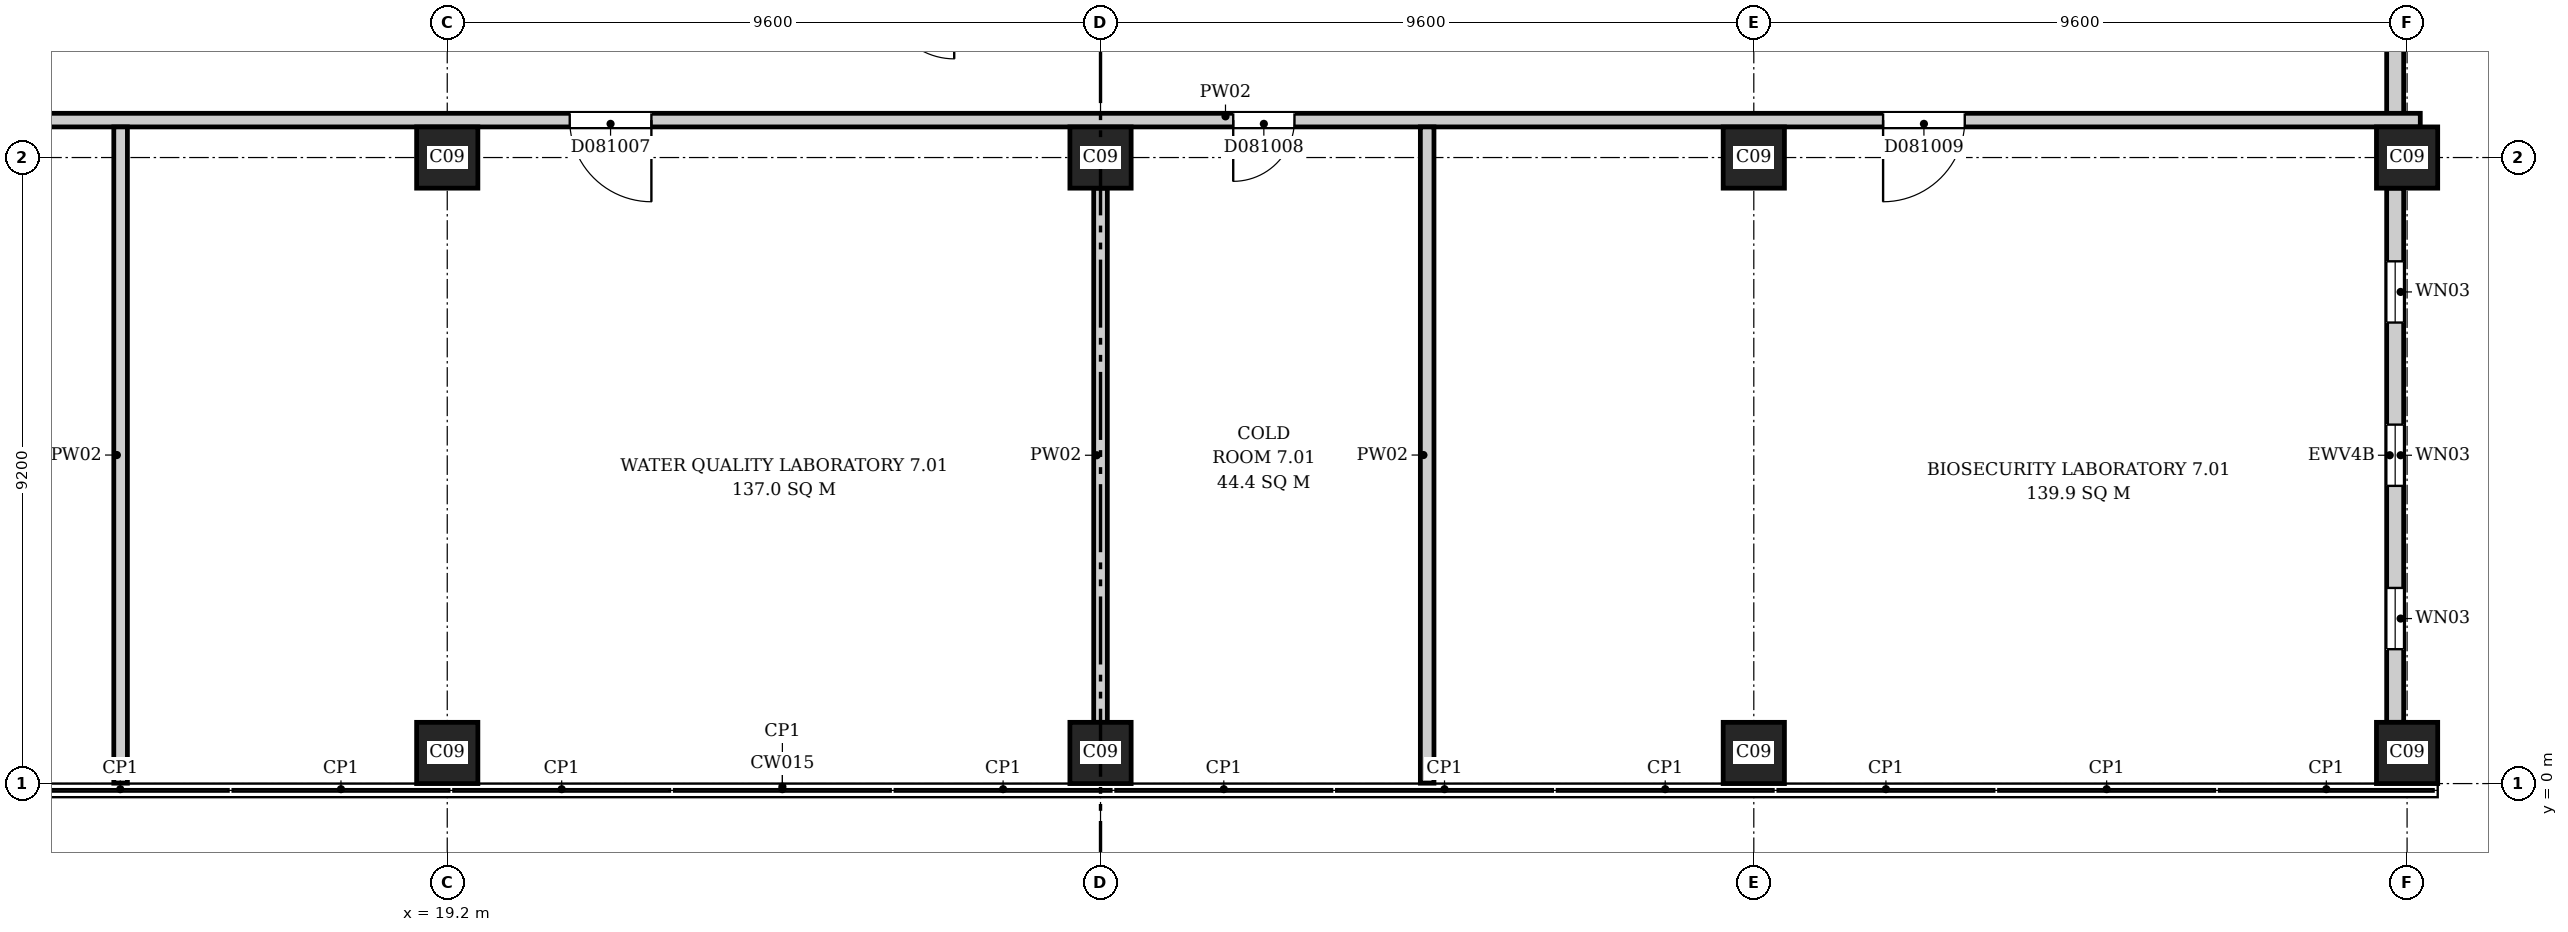
"""IFC4 building model, lengths in metres.
Left out: names, types, materials, properties, quantities, classifications, styles, units other than length and angle.
Written with IfcOpenShell. Run it as: python <this file> out.ifc"""

import sys

from ifc_helpers import new_model, si_unit, direction, frame, frame_2d, origin, origin_2d, place, context, subcontext, project, spatial, rectangle, extrude, element, fill, save


model = new_model("IFC4")
c1 = context("Model", 3, precision=1e-05, world=origin(), true_north=direction((0.0, 1.0)))
c2 = subcontext(c1, "Body", "Model", "MODEL_VIEW")
j1 = project(units=[si_unit("LENGTHUNIT", "METRE"), si_unit("PLANEANGLEUNIT", "RADIAN")], contexts=[c1])
p1 = place(None, origin())
s1 = spatial("IfcSite", under=j1, at=p1, CompositionType="ELEMENT")
p2 = place(p1, origin())
s2 = spatial("IfcBuilding", under=s1, at=p2, CompositionType="ELEMENT")
p3 = place(p2, frame((0.0, 0.0, 40.3)))
s3 = spatial("IfcBuildingStorey", under=s2, at=p3, CompositionType="ELEMENT", Elevation=40.3)
for number, where, z_axis, x_axis in (
    (1, (19.2, 0.45, 0.0), (0.0, 0.0, 1.0), (1.0, 0.0, 0.0)),
    (2, (28.8, 0.45, 0.0), (0.0, 0.0, 1.0), (1.0, 0.0, 0.0)),
    (3, (38.4, 0.45, 0.0), (0.0, 0.0, 1.0), (1.0, 0.0, 0.0)),
    (4, (48.0, 0.45, 0.0), (0.0, 0.0, 1.0), (1.0, 0.0, 0.0)),
    (5, (19.2, 9.2, 0.0), (0.0, 0.0, 1.0), (1.0, 0.0, 0.0)),
    (6, (28.8, 9.2, 0.0), (0.0, 0.0, 1.0), (1.0, 0.0, 0.0)),
    (7, (38.4, 9.2, 0.0), (0.0, 0.0, 1.0), (1.0, 0.0, 0.0)),
    (8, (48.0, 9.2, 0.0), (0.0, 0.0, 1.0), (1.0, 0.0, 0.0)),
):
    element("IfcColumn", number, at=place(p3, frame(where, z_axis=z_axis, x_axis=x_axis)), inside=s3, PredefinedType="COLUMN", context=c2, shape_type="SweptSolid", body=[
        extrude(rectangle(XDim=0.9, YDim=0.9, at=origin_2d()), origin(), (0.0, 0.0, 1.0), 4.2),
    ])
p4 = place(p3, frame((47.825, 0.9, 0.0), z_axis=(0.0, 0.0, 1.0), x_axis=(0.0, 1.0, 0.0)))
e9 = element("IfcWall", 9, at=p4, inside=s3, PredefinedType="ELEMENTEDWALL", context=c2, shape_type="SweptSolid", body=[
    extrude(rectangle(XDim=7.85, YDim=0.25, at=frame_2d((3.925, 0.0))), origin(), (0.0, 0.0, 1.0), 3.3),
])
p5 = place(p4, frame((1.075, 0.0, 0.6)))
e10 = element("IfcOpeningElement", 10, at=p5, cuts=e9, PredefinedType="OPENING", context=c2, shape_type="SweptSolid", body=[
    extrude(rectangle(XDim=0.9, YDim=2.6, at=frame_2d((0.45, 1.3))), frame((0.0, 0.135, 0.0), z_axis=(0.0, -1.0, 0.0), x_axis=(1.0, 0.0, 0.0)), (0.0, 0.0, 1.0), 0.27),
])
p6 = place(p4, frame((3.475, 0.0, 0.6)))
e11 = element("IfcOpeningElement", 11, at=p6, cuts=e9, PredefinedType="OPENING", context=c2, shape_type="SweptSolid", body=[
    extrude(rectangle(XDim=0.9, YDim=2.6, at=frame_2d((0.45, 1.3))), frame((0.0, 0.135, 0.0), z_axis=(0.0, -1.0, 0.0), x_axis=(1.0, 0.0, 0.0)), (0.0, 0.0, 1.0), 0.27),
])
p7 = place(p4, frame((5.875, 0.0, 0.6)))
e12 = element("IfcOpeningElement", 12, at=p7, cuts=e9, PredefinedType="OPENING", context=c2, shape_type="SweptSolid", body=[
    extrude(rectangle(XDim=0.9, YDim=2.6, at=frame_2d((0.45, 1.3))), frame((0.0, 0.135, 0.0), z_axis=(0.0, -1.0, 0.0), x_axis=(1.0, 0.0, 0.0)), (0.0, 0.0, 1.0), 0.27),
])
p8 = place(p3, frame((47.825, 9.65, 0.0), z_axis=(0.0, 0.0, 1.0), x_axis=(0.0, 1.0, 0.0)))
e13 = element("IfcWall", 13, at=p8, inside=s3, PredefinedType="ELEMENTEDWALL", context=c2, shape_type="SweptSolid", body=[
    extrude(rectangle(XDim=8.3, YDim=0.25, at=frame_2d((4.15, 0.0))), origin(), (0.0, 0.0, 1.0), 3.3),
])
p9 = place(p8, frame((1.3, 0.0, 0.6)))
e14 = element("IfcOpeningElement", 14, at=p9, cuts=e13, PredefinedType="OPENING", context=c2, shape_type="SweptSolid", body=[
    extrude(rectangle(XDim=0.9, YDim=2.6, at=frame_2d((0.45, 1.3))), frame((0.0, 0.135, 0.0), z_axis=(0.0, -1.0, 0.0), x_axis=(1.0, 0.0, 0.0)), (0.0, 0.0, 1.0), 0.27),
])
p10 = place(p8, frame((3.7, 0.0, 0.6)))
e15 = element("IfcOpeningElement", 15, at=p10, cuts=e13, PredefinedType="OPENING", context=c2, shape_type="SweptSolid", body=[
    extrude(rectangle(XDim=0.9, YDim=2.6, at=frame_2d((0.45, 1.3))), frame((0.0, 0.135, 0.0), z_axis=(0.0, -1.0, 0.0), x_axis=(1.0, 0.0, 0.0)), (0.0, 0.0, 1.0), 0.27),
])
p11 = place(p8, frame((6.1, 0.0, 0.6)))
e16 = element("IfcOpeningElement", 16, at=p11, cuts=e13, PredefinedType="OPENING", context=c2, shape_type="SweptSolid", body=[
    extrude(rectangle(XDim=0.9, YDim=2.6, at=frame_2d((0.45, 1.3))), frame((0.0, 0.135, 0.0), z_axis=(0.0, -1.0, 0.0), x_axis=(1.0, 0.0, 0.0)), (0.0, 0.0, 1.0), 0.27),
])
p12 = place(p3, frame((4.3, 9.75, 0.0), z_axis=(0.0, 0.0, 1.0), x_axis=(1.0, 0.0, 0.0)))
e17 = element("IfcWall", 17, at=p12, inside=s3, PredefinedType="PARTITIONING", context=c2, shape_type="SweptSolid", body=[
    extrude(rectangle(XDim=43.894, YDim=0.2, at=frame_2d((21.947, 0.0))), origin(), (0.0, 0.0, 1.0), 3.9),
])
p13 = place(p12, frame((3.65, 0.0, 0.0)))
e18 = element("IfcOpeningElement", 18, at=p13, cuts=e17, PredefinedType="OPENING", context=c2, shape_type="SweptSolid", body=[
    extrude(rectangle(XDim=1.2, YDim=2.1, at=frame_2d((0.6, 1.05))), frame((0.0, 0.11, 0.0), z_axis=(0.0, -1.0, 0.0), x_axis=(1.0, 0.0, 0.0)), (0.0, 0.0, 1.0), 0.22),
])
p14 = place(p12, frame((16.7, 0.0, 0.0)))
e19 = element("IfcOpeningElement", 19, at=p14, cuts=e17, PredefinedType="OPENING", context=c2, shape_type="SweptSolid", body=[
    extrude(rectangle(XDim=1.2, YDim=2.1, at=frame_2d((0.6, 1.05))), frame((0.0, 0.11, 0.0), z_axis=(0.0, -1.0, 0.0), x_axis=(1.0, 0.0, 0.0)), (0.0, 0.0, 1.0), 0.22),
])
p15 = place(p12, frame((26.45, 0.0, 0.0)))
e20 = element("IfcOpeningElement", 20, at=p15, cuts=e17, PredefinedType="OPENING", context=c2, shape_type="SweptSolid", body=[
    extrude(rectangle(XDim=0.9, YDim=2.1, at=frame_2d((0.45, 1.05))), frame((0.0, 0.11, 0.0), z_axis=(0.0, -1.0, 0.0), x_axis=(1.0, 0.0, 0.0)), (0.0, 0.0, 1.0), 0.22),
])
p16 = place(p12, frame((36.0, 0.0, 0.0)))
e21 = element("IfcOpeningElement", 21, at=p16, cuts=e17, PredefinedType="OPENING", context=c2, shape_type="SweptSolid", body=[
    extrude(rectangle(XDim=1.2, YDim=2.1, at=frame_2d((0.6, 1.05))), frame((0.0, 0.11, 0.0), z_axis=(0.0, -1.0, 0.0), x_axis=(1.0, 0.0, 0.0)), (0.0, 0.0, 1.0), 0.22),
])
p17 = place(p3, frame((14.4, 0.006, 0.0), z_axis=(0.0, 0.0, 1.0), x_axis=(0.0, 1.0, 0.0)))
e22 = element("IfcWall", 22, at=p17, inside=s3, PredefinedType="PARTITIONING", context=c2, shape_type="SweptSolid", body=[
    extrude(rectangle(XDim=9.644, YDim=0.2, at=frame_2d((4.822, 0.0))), origin(), (0.0, 0.0, 1.0), 3.9),
])
p18 = place(p3, frame((28.8, 0.9, 0.0), z_axis=(0.0, 0.0, 1.0), x_axis=(0.0, 1.0, 0.0)))
e23 = element("IfcWall", 23, at=p18, inside=s3, PredefinedType="PARTITIONING", context=c2, shape_type="SweptSolid", body=[
    extrude(rectangle(XDim=7.85, YDim=0.2, at=frame_2d((3.925, 0.0))), origin(), (0.0, 0.0, 1.0), 3.9),
])
p19 = place(p3, frame((33.6, 0.006, 0.0), z_axis=(0.0, 0.0, 1.0), x_axis=(0.0, 1.0, 0.0)))
e24 = element("IfcWall", 24, at=p19, inside=s3, PredefinedType="PARTITIONING", context=c2, shape_type="SweptSolid", body=[
    extrude(rectangle(XDim=9.644, YDim=0.2, at=frame_2d((4.822, 0.0))), origin(), (0.0, 0.0, 1.0), 3.9),
])
p20 = place(p5, origin())
e25 = element("IfcWindow", 25, at=p20, inside=s3, PartitioningType="SINGLE_PANEL", PredefinedType="WINDOW", context=c2, shape_type="SweptSolid", body=[
    extrude(rectangle(XDim=0.9, YDim=2.6, at=frame_2d((0.45, 1.3))), frame((0.0, 0.03, 0.0), z_axis=(0.0, -1.0, 0.0), x_axis=(1.0, 0.0, 0.0)), (0.0, 0.0, 1.0), 0.06),
])
fill(e10, e25)
p21 = place(p6, origin())
e26 = element("IfcWindow", 26, at=p21, inside=s3, PartitioningType="SINGLE_PANEL", PredefinedType="WINDOW", context=c2, shape_type="SweptSolid", body=[
    extrude(rectangle(XDim=0.9, YDim=2.6, at=frame_2d((0.45, 1.3))), frame((0.0, 0.03, 0.0), z_axis=(0.0, -1.0, 0.0), x_axis=(1.0, 0.0, 0.0)), (0.0, 0.0, 1.0), 0.06),
])
fill(e11, e26)
p22 = place(p7, origin())
e27 = element("IfcWindow", 27, at=p22, inside=s3, PartitioningType="SINGLE_PANEL", PredefinedType="WINDOW", context=c2, shape_type="SweptSolid", body=[
    extrude(rectangle(XDim=0.9, YDim=2.6, at=frame_2d((0.45, 1.3))), frame((0.0, 0.03, 0.0), z_axis=(0.0, -1.0, 0.0), x_axis=(1.0, 0.0, 0.0)), (0.0, 0.0, 1.0), 0.06),
])
fill(e12, e27)
p23 = place(p14, origin())
e28 = element("IfcDoor", 28, at=p23, inside=s3, OperationType="SINGLE_SWING_RIGHT", PredefinedType="DOOR", context=c2, shape_type="SweptSolid", body=[
    extrude(rectangle(XDim=1.2, YDim=2.1, at=frame_2d((0.6, 1.05))), frame((0.0, 0.025, 0.0), z_axis=(0.0, -1.0, 0.0), x_axis=(1.0, 0.0, 0.0)), (0.0, 0.0, 1.0), 0.05),
])
fill(e19, e28)
p24 = place(p15, origin())
e29 = element("IfcDoor", 29, at=p24, inside=s3, OperationType="SINGLE_SWING_LEFT", PredefinedType="DOOR", context=c2, shape_type="SweptSolid", body=[
    extrude(rectangle(XDim=0.9, YDim=2.1, at=frame_2d((0.45, 1.05))), frame((0.0, 0.025, 0.0), z_axis=(0.0, -1.0, 0.0), x_axis=(1.0, 0.0, 0.0)), (0.0, 0.0, 1.0), 0.05),
])
fill(e20, e29)
p25 = place(p16, origin())
e30 = element("IfcDoor", 30, at=p25, inside=s3, OperationType="SINGLE_SWING_LEFT", PredefinedType="DOOR", context=c2, shape_type="SweptSolid", body=[
    extrude(rectangle(XDim=1.2, YDim=2.1, at=frame_2d((0.6, 1.05))), frame((0.0, 0.025, 0.0), z_axis=(0.0, -1.0, 0.0), x_axis=(1.0, 0.0, 0.0)), (0.0, 0.0, 1.0), 0.05),
])
fill(e21, e30)
save(model, sys.argv[1])
